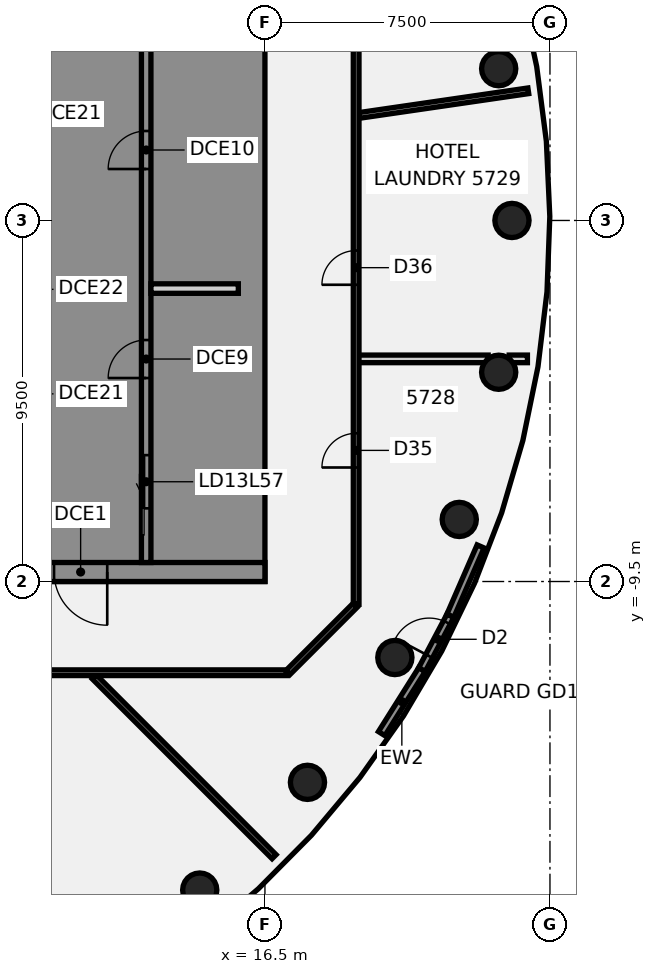
"""IFC4 building model, lengths in metres.
Left out: names, types, materials, properties, quantities, classifications, styles, units other than length and angle.
Written with IfcOpenShell. Run it as: python <this file> out.ifc"""

import sys

from ifc_helpers import new_model, si_unit, direction, frame, frame_2d, origin, origin_2d, place, context, subcontext, project, spatial, polyline, rectangle, circle, outline, extrude, element, fill, save


model = new_model("IFC4")
c1 = context("Model", 3, precision=1e-05, world=origin(), true_north=direction((0.0, 1.0)))
c2 = subcontext(c1, "Body", "Model", "MODEL_VIEW")
j1 = project(units=[si_unit("LENGTHUNIT", "METRE"), si_unit("PLANEANGLEUNIT", "RADIAN")], contexts=[c1])
p1 = place(None, origin())
s1 = spatial("IfcSite", under=j1, at=p1, CompositionType="ELEMENT")
p2 = place(p1, origin())
s2 = spatial("IfcBuilding", under=s1, at=p2, CompositionType="ELEMENT")
p3 = place(p2, frame((0.0, 0.0, 227.1)))
s3 = spatial("IfcBuildingStorey", under=s2, at=p3, CompositionType="ELEMENT", Elevation=227.1)
for number, where, z_axis, x_axis in (
    (1, (23.0, 0.0, -0.14), (0.0, 0.0, 1.0), (1.0, 0.0, 0.0)),
    (2, (22.651, 3.994, -0.14), (0.0, 0.0, 1.0), (1.0, 0.0, 0.0)),
    (3, (14.784, -17.619, -0.14), (0.0, 0.0, 1.0), (1.0, 0.0, 0.0)),
    (4, (17.619, -14.784, -0.14), (0.0, 0.0, 1.0), (1.0, 0.0, 0.0)),
    (5, (19.919, -11.5, -0.14), (0.0, 0.0, 1.0), (1.0, 0.0, 0.0)),
    (6, (21.613, -7.866, -0.14), (0.0, 0.0, 1.0), (1.0, 0.0, 0.0)),
    (7, (22.651, -3.994, -0.14), (0.0, 0.0, 1.0), (1.0, 0.0, 0.0)),
):
    element("IfcColumn", number, at=place(p3, frame(where, z_axis=z_axis, x_axis=x_axis)), inside=s3, PredefinedType="COLUMN", context=c2, shape_type="SweptSolid", body=[
        extrude(circle(Radius=0.45, at=origin_2d()), origin(), (0.0, 0.0, 1.0), 3.6),
    ])
p4 = place(p3, frame((12.01, -12.01, 0.0), z_axis=(0.0, 0.0, 1.0), x_axis=(0.707106781187, -0.707106781187, 0.0)))
e8 = element("IfcWall", 8, at=p4, inside=s3, PredefinedType="PARTITIONING", context=c2, shape_type="SweptSolid", body=[
    extrude(rectangle(XDim=6.691, YDim=0.15, at=frame_2d((3.345, 0.0))), origin(), (0.0, 0.0, 1.0), 2.864),
])
p5 = place(p3, frame((-17.1, -11.9, 0.0), z_axis=(0.0, 0.0, 1.0), x_axis=(1.0, 0.0, 0.0)))
e9 = element("IfcWall", 9, at=p5, inside=s3, PredefinedType="PARTITIONING", context=c2, shape_type="SweptSolid", body=[
    extrude(rectangle(XDim=34.165, YDim=0.15, at=frame_2d((17.083, 0.0))), origin(), (0.0, 0.0, 1.0), 2.864),
])
p6 = place(p5, frame((5.8, 0.0, 0.0)))
e10 = element("IfcOpeningElement", 10, at=p6, cuts=e9, PredefinedType="OPENING", context=c2, shape_type="SweptSolid", body=[
    extrude(rectangle(XDim=1.8, YDim=2.1, at=frame_2d((0.9, 1.05))), frame((0.0, 0.085, 0.0), z_axis=(0.0, -1.0, 0.0), x_axis=(1.0, 0.0, 0.0)), (0.0, 0.0, 1.0), 0.17),
])
p7 = place(p5, frame((12.909, 0.0, 0.0)))
e11 = element("IfcOpeningElement", 11, at=p7, cuts=e9, PredefinedType="OPENING", context=c2, shape_type="SweptSolid", body=[
    extrude(rectangle(XDim=1.8, YDim=2.1, at=frame_2d((0.9, 1.05))), frame((0.0, 0.085, 0.0), z_axis=(0.0, -1.0, 0.0), x_axis=(1.0, 0.0, 0.0)), (0.0, 0.0, 1.0), 0.17),
])
p8 = place(p5, frame((22.974, 0.0, 0.0)))
e12 = element("IfcOpeningElement", 12, at=p8, cuts=e9, PredefinedType="OPENING", context=c2, shape_type="SweptSolid", body=[
    extrude(rectangle(XDim=1.8, YDim=2.1, at=frame_2d((0.9, 1.05))), frame((0.0, 0.085, 0.0), z_axis=(0.0, -1.0, 0.0), x_axis=(1.0, 0.0, 0.0)), (0.0, 0.0, 1.0), 0.17),
])
p9 = place(p5, frame((2.85, 0.0, 0.0)))
e13 = element("IfcOpeningElement", 13, at=p9, cuts=e9, PredefinedType="OPENING", context=c2, shape_type="SweptSolid", body=[
    extrude(rectangle(XDim=0.9, YDim=2.1, at=frame_2d((0.45, 1.05))), frame((0.0, 0.085, 0.0), z_axis=(0.0, -1.0, 0.0), x_axis=(1.0, 0.0, 0.0)), (0.0, 0.0, 1.0), 0.17),
])
p10 = place(p3, frame((18.955, -3.642, 0.0), z_axis=(0.0, 0.0, 1.0), x_axis=(1.0, 0.0, 0.0)))
e14 = element("IfcWall", 14, at=p10, inside=s3, PredefinedType="PARTITIONING", context=c2, shape_type="SweptSolid", body=[
    extrude(rectangle(XDim=3.419, YDim=0.2, at=frame_2d((1.709, 0.0))), origin(), (0.0, 0.0, 1.0), 2.864),
])
p11 = place(p3, frame((22.927, -3.642, 0.0), z_axis=(0.0, 0.0, 1.0), x_axis=(1.0, 0.0, 0.0)))
e15 = element("IfcWall", 15, at=p11, inside=s3, PredefinedType="PARTITIONING", context=c2, shape_type="SweptSolid", body=[
    extrude(rectangle(XDim=0.48, YDim=0.2, at=frame_2d((0.24, 0.0))), origin(), (0.0, 0.0, 1.0), 2.864),
])
p12 = place(p3, frame((18.969, 2.762, 0.0), z_axis=(0.0, 0.0, 1.0), x_axis=(0.989562442657, 0.144104726094, 0.0)))
e16 = element("IfcWall", 16, at=p12, inside=s3, PredefinedType="PARTITIONING", context=c2, shape_type="SweptSolid", body=[
    extrude(rectangle(XDim=4.508, YDim=0.15, at=frame_2d((2.254, 0.0))), origin(), (0.0, 0.0, 1.0), 2.864),
])
p13 = place(p3, frame((17.1, -11.9, 0.0), z_axis=(0.0, 0.0, 1.0), x_axis=(0.707106781187, 0.707106781187, 0.0)))
e17 = element("IfcWall", 17, at=p13, inside=s3, PredefinedType="PARTITIONING", context=c2, shape_type="SweptSolid", body=[
    extrude(rectangle(XDim=2.505, YDim=0.15, at=frame_2d((1.253, 0.0))), origin(), (0.0, 0.0, 1.0), 2.864),
])
p14 = place(p3, frame((18.9, -10.1, 0.0), z_axis=(0.0, 0.0, 1.0), x_axis=(0.0, 1.0, 0.0)))
e18 = element("IfcWall", 18, at=p14, inside=s3, PredefinedType="PARTITIONING", context=c2, shape_type="SweptSolid", body=[
    extrude(rectangle(XDim=20.2, YDim=0.15, at=frame_2d((10.1, 0.0))), origin(), (0.0, 0.0, 1.0), 2.864),
])
p15 = place(p14, frame((3.6, 0.0, 0.0)))
e19 = element("IfcOpeningElement", 19, at=p15, cuts=e18, PredefinedType="OPENING", context=c2, shape_type="SweptSolid", body=[
    extrude(rectangle(XDim=0.9, YDim=2.1, at=frame_2d((0.45, 1.05))), frame((0.0, 0.085, 0.0), z_axis=(0.0, -1.0, 0.0), x_axis=(1.0, 0.0, 0.0)), (0.0, 0.0, 1.0), 0.17),
])
p16 = place(p14, frame((8.408, 0.0, 0.0)))
e20 = element("IfcOpeningElement", 20, at=p16, cuts=e18, PredefinedType="OPENING", context=c2, shape_type="SweptSolid", body=[
    extrude(rectangle(XDim=0.9, YDim=2.1, at=frame_2d((0.45, 1.05))), frame((0.0, 0.085, 0.0), z_axis=(0.0, -1.0, 0.0), x_axis=(1.0, 0.0, 0.0)), (0.0, 0.0, 1.0), 0.17),
])
p17 = place(p3, frame((19.572, -13.502, 0.0), z_axis=(0.0, 0.0, 1.0), x_axis=(0.533079765086, 0.846064988081, 0.0)))
e21 = element("IfcWall", 21, at=p17, inside=s3, PredefinedType="SOLIDWALL", context=c2, shape_type="SweptSolid", body=[
    extrude(rectangle(XDim=1.992, YDim=0.2, at=frame_2d((0.996, 0.0))), origin(), (0.0, 0.0, 1.0), 3.46),
])
p18 = place(p3, frame((21.379, -10.402, 0.0), z_axis=(0.0, 0.0, 1.0), x_axis=(0.399429605242, 0.916763868429, 0.0)))
e22 = element("IfcWall", 22, at=p18, inside=s3, PredefinedType="SOLIDWALL", context=c2, shape_type="SweptSolid", body=[
    extrude(rectangle(XDim=1.992, YDim=0.2, at=frame_2d((0.996, 0.0))), origin(), (0.0, 0.0, 1.0), 3.46),
])
p19 = place(p3, frame((20.634, -11.816, 0.0), z_axis=(0.0, 0.0, 1.0), x_axis=(0.4664135075, 0.884566809247, 0.0)))
e23 = element("IfcWall", 23, at=p19, inside=s3, PredefinedType="SOLIDWALL", context=c2, shape_type="SweptSolid", body=[
    extrude(rectangle(XDim=1.599, YDim=0.2, at=frame_2d((0.799, 0.0))), origin(), (0.0, 0.0, 1.0), 3.46),
])
p20 = place(p19, frame((0.4, 0.0, 0.0)))
e24 = element("IfcOpeningElement", 24, at=p20, cuts=e23, PredefinedType="OPENING", context=c2, shape_type="SweptSolid", body=[
    extrude(rectangle(XDim=1.0, YDim=2.4, at=frame_2d((0.5, 1.2))), frame((0.0, 0.11, 0.0), z_axis=(0.0, -1.0, 0.0), x_axis=(1.0, 0.0, 0.0)), (0.0, 0.0, 1.0), 0.22),
])
p21 = place(p3, frame((16.5, -9.25, 0.0), z_axis=(0.0, 0.0, 1.0), x_axis=(-1.0, 0.0, 0.0)))
e25 = element("IfcWall", 25, at=p21, inside=s3, PredefinedType="SHEAR", context=c2, shape_type="SweptSolid", body=[
    extrude(rectangle(XDim=13.0, YDim=0.5, at=frame_2d((6.5, 0.0))), origin(), (0.0, 0.0, 1.0), 3.46),
])
p22 = place(p21, frame((4.15, 0.0, 0.0)))
e26 = element("IfcOpeningElement", 26, at=p22, cuts=e25, PredefinedType="OPENING", context=c2, shape_type="SweptSolid", body=[
    extrude(rectangle(XDim=1.4, YDim=2.1, at=frame_2d((0.7, 1.05))), frame((0.0, 0.26, 0.0), z_axis=(0.0, -1.0, 0.0), x_axis=(1.0, 0.0, 0.0)), (0.0, 0.0, 1.0), 0.52),
])
p23 = place(p21, frame((10.125, 0.0, 0.0)))
e27 = element("IfcOpeningElement", 27, at=p23, cuts=e25, PredefinedType="OPENING", context=c2, shape_type="SweptSolid", body=[
    extrude(rectangle(XDim=1.4, YDim=2.1, at=frame_2d((0.7, 1.05))), frame((0.0, 0.26, 0.0), z_axis=(0.0, -1.0, 0.0), x_axis=(1.0, 0.0, 0.0)), (0.0, 0.0, 1.0), 0.52),
])
p24 = place(p3, origin())
e28 = element("IfcWall", 28, at=p24, inside=s3, PredefinedType="SHEAR", context=c2, shape_type="SweptSolid", body=[
    extrude(outline(polyline([(13.5, -8.125), (13.5, -9.0), (16.0, -9.0), (16.5, -9.0), (16.5, 9.0), (16.0, 9.0), (13.5, 9.0), (13.5, 8.125), (16.0, 8.125), (16.0, 5.625), (13.5, 5.625), (13.5, 5.375), (16.0, 5.375), (16.0, -5.375), (13.5, -5.375), (13.5, -5.625), (16.0, -5.625), (16.0, -8.125), (13.5, -8.125)])), origin(), (0.0, 0.0, 1.0), 3.46),
])
p25 = place(p3, frame((13.375, -9.0, 0.0), z_axis=(0.0, 0.0, 1.0), x_axis=(0.0, 1.0, 0.0)))
e29 = element("IfcWall", 29, at=p25, inside=s3, PredefinedType="SHEAR", context=c2, shape_type="SweptSolid", body=[
    extrude(rectangle(XDim=18.0, YDim=0.25, at=frame_2d((9.0, 0.0))), origin(), (0.0, 0.0, 1.0), 3.46),
])
p26 = place(p25, frame((1.425, 0.0, 0.0)))
e30 = element("IfcOpeningElement", 30, at=p26, cuts=e29, PredefinedType="OPENING", context=c2, shape_type="SweptSolid", body=[
    extrude(rectangle(XDim=1.4, YDim=2.1, at=frame_2d((0.7, 1.05))), frame((0.0, 0.135, 0.0), z_axis=(0.0, -1.0, 0.0), x_axis=(1.0, 0.0, 0.0)), (0.0, 0.0, 1.0), 0.27),
])
p27 = place(p25, frame((4.854, 0.0, 0.0)))
e31 = element("IfcOpeningElement", 31, at=p27, cuts=e29, PredefinedType="OPENING", context=c2, shape_type="SweptSolid", body=[
    extrude(rectangle(XDim=1.0, YDim=2.1, at=frame_2d((0.5, 1.05))), frame((0.0, 0.135, 0.0), z_axis=(0.0, -1.0, 0.0), x_axis=(1.0, 0.0, 0.0)), (0.0, 0.0, 1.0), 0.27),
])
p28 = place(p25, frame((10.354, 0.0, 0.0)))
e32 = element("IfcOpeningElement", 32, at=p28, cuts=e29, PredefinedType="OPENING", context=c2, shape_type="SweptSolid", body=[
    extrude(rectangle(XDim=1.0, YDim=2.1, at=frame_2d((0.5, 1.05))), frame((0.0, 0.135, 0.0), z_axis=(0.0, -1.0, 0.0), x_axis=(1.0, 0.0, 0.0)), (0.0, 0.0, 1.0), 0.27),
])
p29 = place(p3, frame((15.8, -1.792, 0.0), z_axis=(0.0, 0.0, 1.0), x_axis=(-1.0, 0.0, 0.0)))
e33 = element("IfcWall", 33, at=p29, inside=s3, PredefinedType="PARTITIONING", context=c2, shape_type="SweptSolid", body=[
    extrude(rectangle(XDim=2.3, YDim=0.25, at=frame_2d((1.15, 0.0))), origin(), (0.0, 0.0, 1.0), 3.46),
])
p30 = place(p15, frame((0.9, 0.0, 0.0), z_axis=(0.0, 0.0, 1.0), x_axis=(-1.0, 0.0, 0.0)))
e34 = element("IfcDoor", 34, at=p30, inside=s3, OperationType="SINGLE_SWING_LEFT", PredefinedType="DOOR", context=c2, shape_type="SweptSolid", body=[
    extrude(rectangle(XDim=0.9, YDim=2.1, at=frame_2d((0.45, 1.05))), frame((0.0, 0.025, 0.0), z_axis=(0.0, -1.0, 0.0), x_axis=(1.0, 0.0, 0.0)), (0.0, 0.0, 1.0), 0.05),
])
fill(e19, e34)
p31 = place(p16, frame((0.9, 0.0, 0.0), z_axis=(0.0, 0.0, 1.0), x_axis=(-1.0, 0.0, 0.0)))
e35 = element("IfcDoor", 35, at=p31, inside=s3, OperationType="SINGLE_SWING_LEFT", PredefinedType="DOOR", context=c2, shape_type="SweptSolid", body=[
    extrude(rectangle(XDim=0.9, YDim=2.1, at=frame_2d((0.45, 1.05))), frame((0.0, 0.025, 0.0), z_axis=(0.0, -1.0, 0.0), x_axis=(1.0, 0.0, 0.0)), (0.0, 0.0, 1.0), 0.05),
])
fill(e20, e35)
p32 = place(p20, origin())
e36 = element("IfcDoor", 36, at=p32, inside=s3, OperationType="SINGLE_SWING_LEFT", PredefinedType="DOOR", context=c2, shape_type="SweptSolid", body=[
    extrude(rectangle(XDim=1.0, YDim=2.4, at=frame_2d((0.5, 1.2))), frame((0.0, 0.025, 0.0), z_axis=(0.0, -1.0, 0.0), x_axis=(1.0, 0.0, 0.0)), (0.0, 0.0, 1.0), 0.05),
])
fill(e24, e36)
p33 = place(p22, origin())
e37 = element("IfcDoor", 37, at=p33, inside=s3, OperationType="SINGLE_SWING_LEFT", PredefinedType="DOOR", context=c2, shape_type="SweptSolid", body=[
    extrude(rectangle(XDim=1.4, YDim=2.1, at=frame_2d((0.7, 1.05))), frame((0.0, 0.025, 0.0), z_axis=(0.0, -1.0, 0.0), x_axis=(1.0, 0.0, 0.0)), (0.0, 0.0, 1.0), 0.05),
])
fill(e26, e37)
p34 = place(p26, origin())
e38 = element("IfcDoor", 38, at=p34, inside=s3, OperationType="SLIDING_TO_LEFT", PredefinedType="DOOR", context=c2, shape_type="SweptSolid", body=[
    extrude(rectangle(XDim=1.4, YDim=2.1, at=frame_2d((0.7, 1.05))), frame((0.0, 0.025, 0.0), z_axis=(0.0, -1.0, 0.0), x_axis=(1.0, 0.0, 0.0)), (0.0, 0.0, 1.0), 0.05),
])
fill(e30, e38)
p35 = place(p27, origin())
e39 = element("IfcDoor", 39, at=p35, inside=s3, OperationType="SINGLE_SWING_LEFT", PredefinedType="DOOR", context=c2, shape_type="SweptSolid", body=[
    extrude(rectangle(XDim=1.0, YDim=2.1, at=frame_2d((0.5, 1.05))), frame((0.0, 0.025, 0.0), z_axis=(0.0, -1.0, 0.0), x_axis=(1.0, 0.0, 0.0)), (0.0, 0.0, 1.0), 0.05),
])
fill(e31, e39)
p36 = place(p28, origin())
e40 = element("IfcDoor", 40, at=p36, inside=s3, OperationType="SINGLE_SWING_LEFT", PredefinedType="DOOR", context=c2, shape_type="SweptSolid", body=[
    extrude(rectangle(XDim=1.0, YDim=2.1, at=frame_2d((0.5, 1.05))), frame((0.0, 0.025, 0.0), z_axis=(0.0, -1.0, 0.0), x_axis=(1.0, 0.0, 0.0)), (0.0, 0.0, 1.0), 0.05),
])
fill(e32, e40)
save(model, sys.argv[1])
